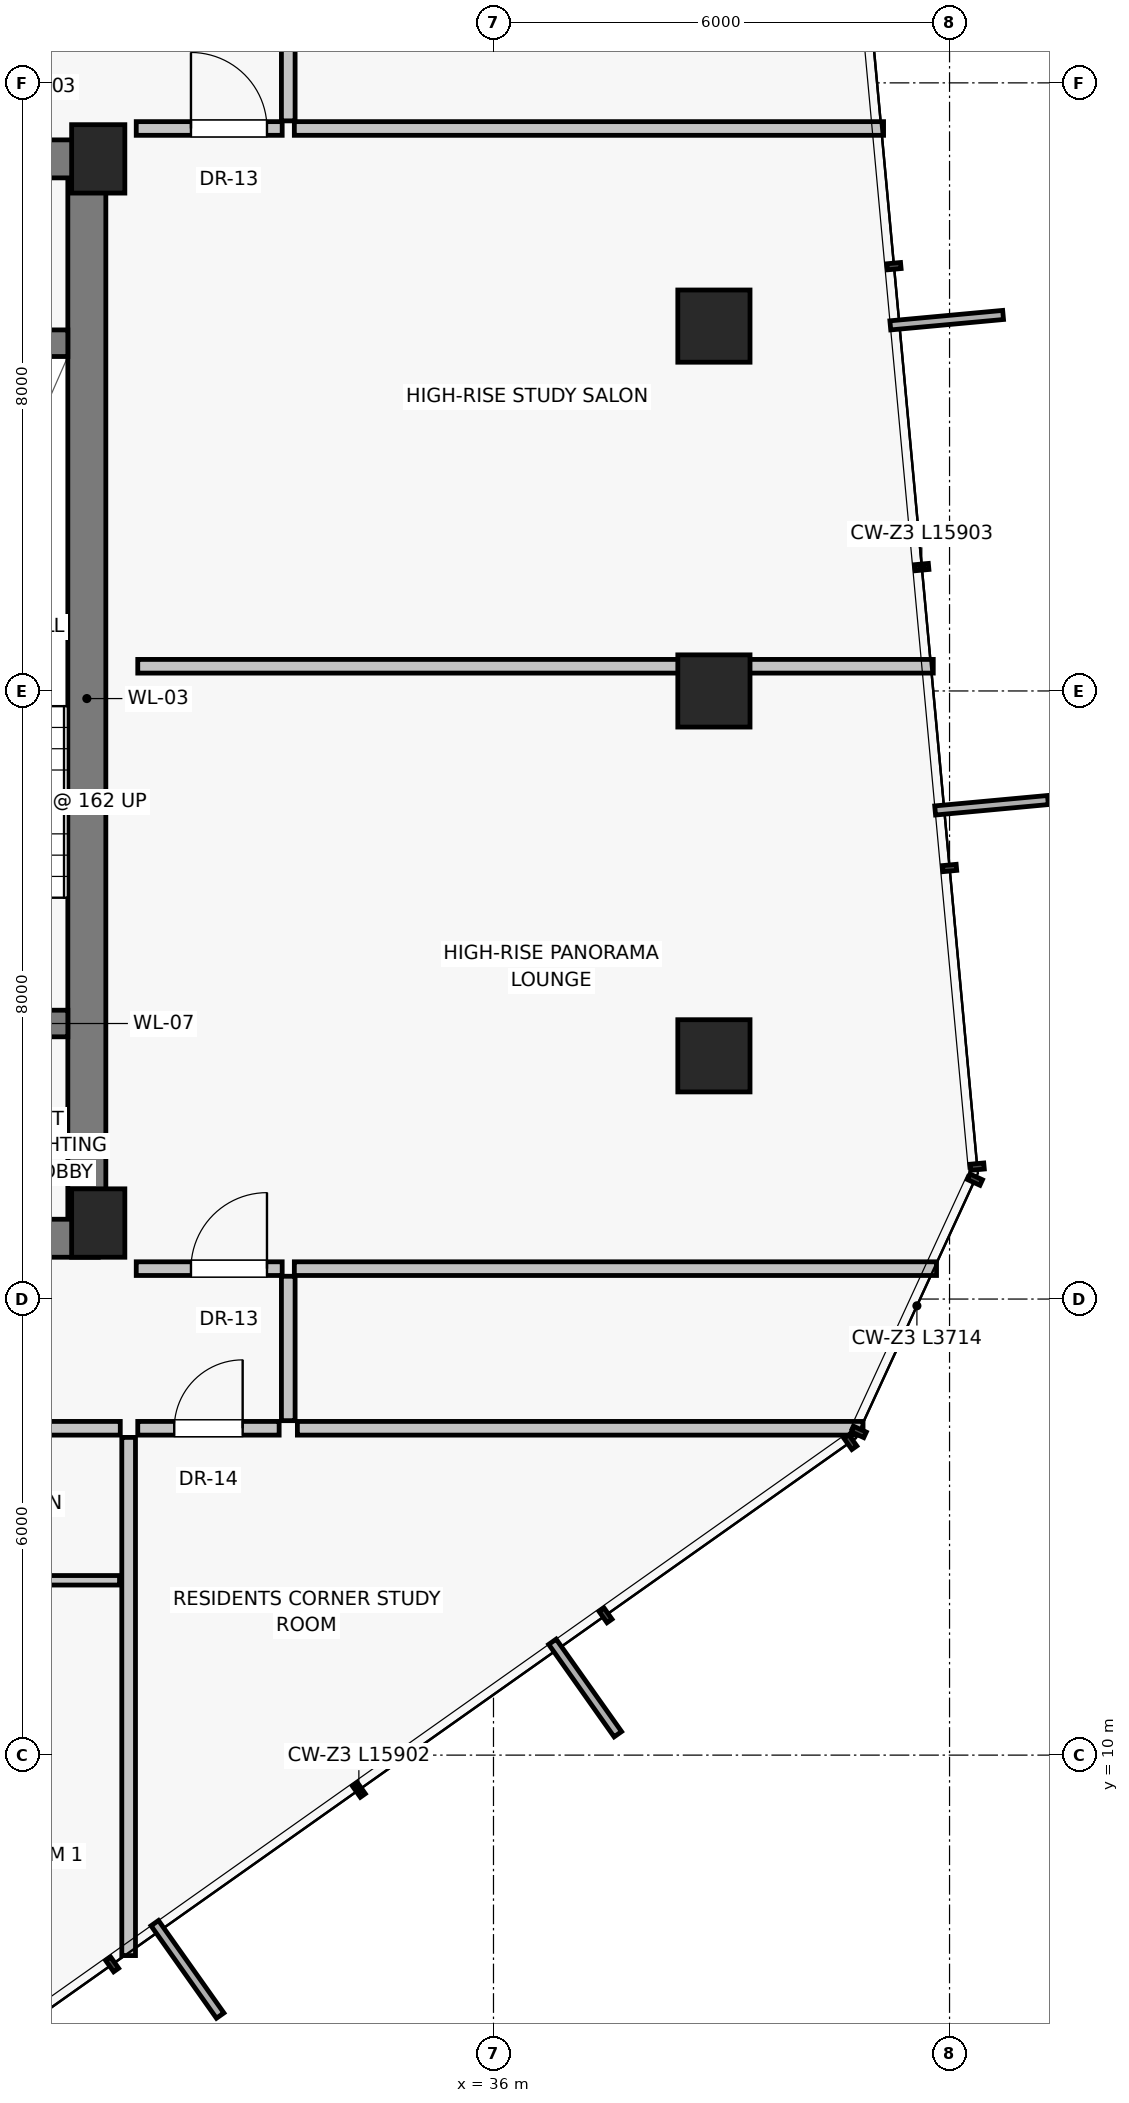
"""IFC4 building model, lengths in metres.
Left out: names, types, materials, properties, quantities, classifications, styles, units other than length and angle.
Written with IfcOpenShell. Run it as: python <this file> out.ifc"""

import sys

from ifc_helpers import new_model, si_unit, direction, frame, frame_2d, origin, origin_2d, place, context, subcontext, project, spatial, rectangle, extrude, source, transform, mapped, element, fill, save


model = new_model("IFC4")
c1 = context("Model", 3, precision=1e-05, world=origin(), true_north=direction((0.0, 1.0)))
c2 = subcontext(c1, "Body", "Model", "MODEL_VIEW")
j1 = project(units=[si_unit("LENGTHUNIT", "METRE"), si_unit("PLANEANGLEUNIT", "RADIAN")], contexts=[c1])
p1 = place(None, origin())
s1 = spatial("IfcSite", under=j1, at=p1, CompositionType="ELEMENT")
p2 = place(p1, origin())
s2 = spatial("IfcBuilding", under=s1, at=p2, CompositionType="ELEMENT")
p3 = place(p2, frame((0.0, 0.0, 188.6)))
s3 = spatial("IfcBuildingStorey", under=s2, at=p3, CompositionType="ELEMENT", Elevation=188.6)
for number, where, z_axis, x_axis in (
    (1, (30.8, 17.0, 0.0), (0.0, 0.0, 1.0), (1.0, 0.0, 0.0)),
    (2, (30.8, 31.0, 0.0), (0.0, 0.0, 1.0), (1.0, 0.0, 0.0)),
):
    element("IfcColumn", number, at=place(p3, frame(where, z_axis=z_axis, x_axis=x_axis)), inside=s3, PredefinedType="PILASTER", context=c2, shape_type="SweptSolid", body=[
        extrude(rectangle(XDim=0.7, YDim=0.9, at=origin_2d()), origin(), (0.0, 0.0, 1.0), 3.25),
    ])
for number, where, z_axis, x_axis in (
    (3, (38.9, 19.2, 0.0), (0.0, 0.0, 1.0), (1.0, 0.0, 0.0)),
    (4, (38.9, 24.0, 0.0), (0.0, 0.0, 1.0), (1.0, 0.0, 0.0)),
    (5, (38.9, 28.8, 0.0), (0.0, 0.0, 1.0), (1.0, 0.0, 0.0)),
):
    element("IfcColumn", number, at=place(p3, frame(where, z_axis=z_axis, x_axis=x_axis)), inside=s3, PredefinedType="COLUMN", context=c2, shape_type="SweptSolid", body=[
        extrude(rectangle(XDim=0.95, YDim=0.95, at=origin_2d()), origin(), (0.0, 0.0, 1.0), 3.25),
    ])
p4 = place(p3, frame((30.65, 16.8, 0.0), z_axis=(0.0, 0.0, 1.0), x_axis=(0.0, 1.0, 0.0)))
e6 = element("IfcWall", 6, at=p4, inside=s3, PredefinedType="SHEAR", context=c2, shape_type="SweptSolid", body=[
    extrude(rectangle(XDim=14.2, YDim=0.5, at=frame_2d((7.1, 0.0))), origin(), (0.0, 0.0, 1.0), 3.015),
])
p5 = place(p3, frame((24.95, 16.8, 0.0), z_axis=(0.0, 0.0, 1.0), x_axis=(1.0, 0.0, 0.0)))
e7 = element("IfcWall", 7, at=p5, inside=s3, PredefinedType="SHEAR", context=c2, shape_type="SweptSolid", body=[
    extrude(rectangle(XDim=5.85, YDim=0.5, at=frame_2d((2.925, 0.0))), origin(), (0.0, 0.0, 1.0), 3.015),
])
p6 = place(p5, frame((2.15, 0.0, 0.0)))
e8 = element("IfcOpeningElement", 8, at=p6, cuts=e7, PredefinedType="OPENING", context=c2, shape_type="SweptSolid", body=[
    extrude(rectangle(XDim=1.2, YDim=2.03, at=frame_2d((0.6, 1.015))), frame((0.0, 0.26, 0.0), z_axis=(0.0, -1.0, 0.0), x_axis=(1.0, 0.0, 0.0)), (0.0, 0.0, 1.0), 0.52),
])
p7 = place(p3, frame((27.0, 31.0, 0.0), z_axis=(0.0, 0.0, 1.0), x_axis=(1.0, 0.0, 0.0)))
e9 = element("IfcWall", 9, at=p7, inside=s3, PredefinedType="SHEAR", context=c2, shape_type="SweptSolid", body=[
    extrude(rectangle(XDim=3.8, YDim=0.5, at=frame_2d((1.9, 0.0))), origin(), (0.0, 0.0, 1.0), 3.015),
])
p8 = place(p7, frame((1.15, 0.0, 0.0)))
e10 = element("IfcOpeningElement", 10, at=p8, cuts=e9, PredefinedType="OPENING", context=c2, shape_type="SweptSolid", body=[
    extrude(rectangle(XDim=1.0, YDim=2.01, at=frame_2d((0.5, 1.005))), frame((0.0, 0.26, 0.0), z_axis=(0.0, -1.0, 0.0), x_axis=(1.0, 0.0, 0.0)), (0.0, 0.0, 1.0), 0.52),
])
p9 = place(p3, frame((27.025, 19.625, 0.0), z_axis=(0.0, 0.0, 1.0), x_axis=(1.0, 0.0, 0.0)))
e11 = element("IfcWall", 11, at=p9, inside=s3, PredefinedType="SHEAR", context=c2, shape_type="SweptSolid", body=[
    extrude(rectangle(XDim=3.375, YDim=0.35, at=frame_2d((1.688, 0.0))), origin(), (0.0, 0.0, 1.0), 3.015),
])
p10 = place(p9, frame((1.05, 0.0, 0.0)))
e12 = element("IfcOpeningElement", 12, at=p10, cuts=e11, PredefinedType="OPENING", context=c2, shape_type="SweptSolid", body=[
    extrude(rectangle(XDim=1.1, YDim=2.03, at=frame_2d((0.55, 1.015))), frame((0.0, 0.185, 0.0), z_axis=(0.0, -1.0, 0.0), x_axis=(1.0, 0.0, 0.0)), (0.0, 0.0, 1.0), 0.37),
])
p11 = place(p3, frame((27.025, 28.575, 0.0), z_axis=(0.0, 0.0, 1.0), x_axis=(1.0, 0.0, 0.0)))
e13 = element("IfcWall", 13, at=p11, inside=s3, PredefinedType="SHEAR", context=c2, shape_type="SweptSolid", body=[
    extrude(rectangle(XDim=3.375, YDim=0.35, at=frame_2d((1.688, 0.0))), origin(), (0.0, 0.0, 1.0), 3.015),
])
p12 = place(p3, frame((31.2, 14.18, 0.0), z_axis=(0.0, 0.0, 1.0), x_axis=(0.0, -1.0, 0.0)))
e14 = element("IfcWall", 14, at=p12, inside=s3, PredefinedType="PARTITIONING", context=c2, shape_type="SweptSolid", body=[
    extrude(rectangle(XDim=6.817, YDim=0.18, at=frame_2d((3.409, 0.0))), origin(), (0.0, 0.0, 1.0), 3.015),
])
p13 = place(p3, frame((19.31, 14.3, 0.0), z_axis=(0.0, 0.0, 1.0), x_axis=(1.0, 0.0, 0.0)))
e15 = element("IfcWall", 15, at=p13, inside=s3, PredefinedType="PARTITIONING", context=c2, shape_type="SweptSolid", body=[
    extrude(rectangle(XDim=11.78, YDim=0.18, at=frame_2d((5.89, 0.0))), origin(), (0.0, 0.0, 1.0), 3.015),
])
p14 = place(p13, frame((3.98, 0.0, 0.0)))
e16 = element("IfcOpeningElement", 16, at=p14, cuts=e15, PredefinedType="OPENING", context=c2, shape_type="SweptSolid", body=[
    extrude(rectangle(XDim=0.95, YDim=2.02, at=frame_2d((0.475, 1.01))), frame((0.0, 0.1, 0.0), z_axis=(0.0, -1.0, 0.0), x_axis=(1.0, 0.0, 0.0)), (0.0, 0.0, 1.0), 0.2),
])
p15 = place(p3, frame((26.18, 12.3, 0.0), z_axis=(0.0, 0.0, 1.0), x_axis=(1.0, 0.0, 0.0)))
e17 = element("IfcWall", 17, at=p15, inside=s3, PredefinedType="PARTITIONING", context=c2, shape_type="SweptSolid", body=[
    extrude(rectangle(XDim=4.9, YDim=0.125, at=frame_2d((2.45, 0.0))), origin(), (0.0, 0.0, 1.0), 3.015),
])
p16 = place(p3, frame((31.32, 24.325, 0.0), z_axis=(0.0, 0.0, 1.0), x_axis=(1.0, 0.0, 0.0)))
e18 = element("IfcWall", 18, at=p16, inside=s3, PredefinedType="PARTITIONING", context=c2, shape_type="SweptSolid", body=[
    extrude(rectangle(XDim=10.466, YDim=0.18, at=frame_2d((5.233, 0.0))), origin(), (0.0, 0.0, 1.0), 3.015),
])
p17 = place(p3, frame((33.3, 14.4, 0.0), z_axis=(0.0, 0.0, 1.0), x_axis=(0.0, 1.0, 0.0)))
e19 = element("IfcWall", 19, at=p17, inside=s3, PredefinedType="PARTITIONING", context=c2, shape_type="SweptSolid", body=[
    extrude(rectangle(XDim=1.9, YDim=0.18, at=frame_2d((0.95, 0.0))), origin(), (0.0, 0.0, 1.0), 3.015),
])
p18 = place(p3, frame((33.3, 31.5, 0.0), z_axis=(0.0, 0.0, 1.0), x_axis=(0.0, 1.0, 0.0)))
e20 = element("IfcWall", 20, at=p18, inside=s3, PredefinedType="PARTITIONING", context=c2, shape_type="SweptSolid", body=[
    extrude(rectangle(XDim=1.9, YDim=0.18, at=frame_2d((0.95, 0.0))), origin(), (0.0, 0.0, 1.0), 3.015),
])
p19 = place(p3, frame((31.3, 16.4, 0.0), z_axis=(0.0, 0.0, 1.0), x_axis=(1.0, 0.0, 0.0)))
e21 = element("IfcWall", 21, at=p19, inside=s3, PredefinedType="PARTITIONING", context=c2, shape_type="SweptSolid", body=[
    extrude(rectangle(XDim=1.92, YDim=0.18, at=frame_2d((0.96, 0.0))), origin(), (0.0, 0.0, 1.0), 3.015),
])
p20 = place(p19, frame((0.72, 0.0, 0.0)))
e22 = element("IfcOpeningElement", 22, at=p20, cuts=e21, PredefinedType="OPENING", context=c2, shape_type="SweptSolid", body=[
    extrude(rectangle(XDim=1.0, YDim=2.01, at=frame_2d((0.5, 1.005))), frame((0.0, 0.1, 0.0), z_axis=(0.0, -1.0, 0.0), x_axis=(1.0, 0.0, 0.0)), (0.0, 0.0, 1.0), 0.2),
])
p21 = place(p3, frame((33.38, 16.4, 0.0), z_axis=(0.0, 0.0, 1.0), x_axis=(1.0, 0.0, 0.0)))
e23 = element("IfcWall", 23, at=p21, inside=s3, PredefinedType="PARTITIONING", context=c2, shape_type="SweptSolid", body=[
    extrude(rectangle(XDim=8.449, YDim=0.18, at=frame_2d((4.224, 0.0))), origin(), (0.0, 0.0, 1.0), 3.015),
])
p22 = place(p3, frame((31.3, 31.4, 0.0), z_axis=(0.0, 0.0, 1.0), x_axis=(1.0, 0.0, 0.0)))
e24 = element("IfcWall", 24, at=p22, inside=s3, PredefinedType="PARTITIONING", context=c2, shape_type="SweptSolid", body=[
    extrude(rectangle(XDim=1.92, YDim=0.18, at=frame_2d((0.96, 0.0))), origin(), (0.0, 0.0, 1.0), 3.015),
])
p23 = place(p22, frame((0.72, 0.0, 0.0)))
e25 = element("IfcOpeningElement", 25, at=p23, cuts=e24, PredefinedType="OPENING", context=c2, shape_type="SweptSolid", body=[
    extrude(rectangle(XDim=1.0, YDim=2.01, at=frame_2d((0.5, 1.005))), frame((0.0, 0.1, 0.0), z_axis=(0.0, -1.0, 0.0), x_axis=(1.0, 0.0, 0.0)), (0.0, 0.0, 1.0), 0.2),
])
p24 = place(p3, frame((33.38, 31.4, 0.0), z_axis=(0.0, 0.0, 1.0), x_axis=(1.0, 0.0, 0.0)))
e26 = element("IfcWall", 26, at=p24, inside=s3, PredefinedType="PARTITIONING", context=c2, shape_type="SweptSolid", body=[
    extrude(rectangle(XDim=7.752, YDim=0.18, at=frame_2d((3.876, 0.0))), origin(), (0.0, 0.0, 1.0), 3.015),
])
p25 = place(p3, frame((33.42, 14.3, 0.0), z_axis=(0.0, 0.0, 1.0), x_axis=(1.0, 0.0, 0.0)))
e27 = element("IfcWall", 27, at=p25, inside=s3, PredefinedType="PARTITIONING", context=c2, shape_type="SweptSolid", body=[
    extrude(rectangle(XDim=7.442, YDim=0.18, at=frame_2d((3.721, 0.0))), origin(), (0.0, 0.0, 1.0), 3.015),
])
p26 = place(p3, frame((31.32, 14.3, 0.0), z_axis=(0.0, 0.0, 1.0), x_axis=(1.0, 0.0, 0.0)))
e28 = element("IfcWall", 28, at=p26, inside=s3, PredefinedType="PARTITIONING", context=c2, shape_type="SweptSolid", body=[
    extrude(rectangle(XDim=1.86, YDim=0.18, at=frame_2d((0.93, 0.0))), origin(), (0.0, 0.0, 1.0), 3.015),
])
p27 = place(p26, frame((0.48, 0.0, 0.0)))
e29 = element("IfcOpeningElement", 29, at=p27, cuts=e28, PredefinedType="OPENING", context=c2, shape_type="SweptSolid", body=[
    extrude(rectangle(XDim=0.9, YDim=2.01, at=frame_2d((0.45, 1.005))), frame((0.0, 0.1, 0.0), z_axis=(0.0, -1.0, 0.0), x_axis=(1.0, 0.0, 0.0)), (0.0, 0.0, 1.0), 0.2),
])
m1 = source(origin(), c2, "Body", "SweptSolid", [
    extrude(rectangle(XDim=1.0, YDim=2.01, at=frame_2d((0.5, 1.005))), frame((0.0, 0.025, 0.0), z_axis=(0.0, -1.0, 0.0), x_axis=(1.0, 0.0, 0.0)), (0.0, 0.0, 1.0), 0.05),
])
p28 = place(p20, origin())
e30 = element("IfcDoor", 30, at=p28, inside=s3, OperationType="SINGLE_SWING_RIGHT", PredefinedType="DOOR", context=c2, shape_type="MappedRepresentation", body=[
    mapped(m1, transform((0.0, 0.0, 0.0), scale=1.0)),
])
fill(e22, e30)
p29 = place(p23, origin())
e31 = element("IfcDoor", 31, at=p29, inside=s3, OperationType="SINGLE_SWING_LEFT", PredefinedType="DOOR", context=c2, shape_type="MappedRepresentation", body=[
    mapped(m1, transform((0.0, 0.0, 0.0), scale=1.0)),
])
fill(e25, e31)
m2 = source(origin(), c2, "Body", "SweptSolid", [
    extrude(rectangle(XDim=0.9, YDim=2.01, at=frame_2d((0.45, 1.005))), frame((0.0, 0.025, 0.0), z_axis=(0.0, -1.0, 0.0), x_axis=(1.0, 0.0, 0.0)), (0.0, 0.0, 1.0), 0.05),
])
p30 = place(p27, origin())
e32 = element("IfcDoor", 32, at=p30, inside=s3, OperationType="SINGLE_SWING_RIGHT", PredefinedType="DOOR", context=c2, shape_type="MappedRepresentation", body=[
    mapped(m2, transform((0.0, 0.0, 0.0), scale=1.0)),
])
fill(e29, e32)
save(model, sys.argv[1])
